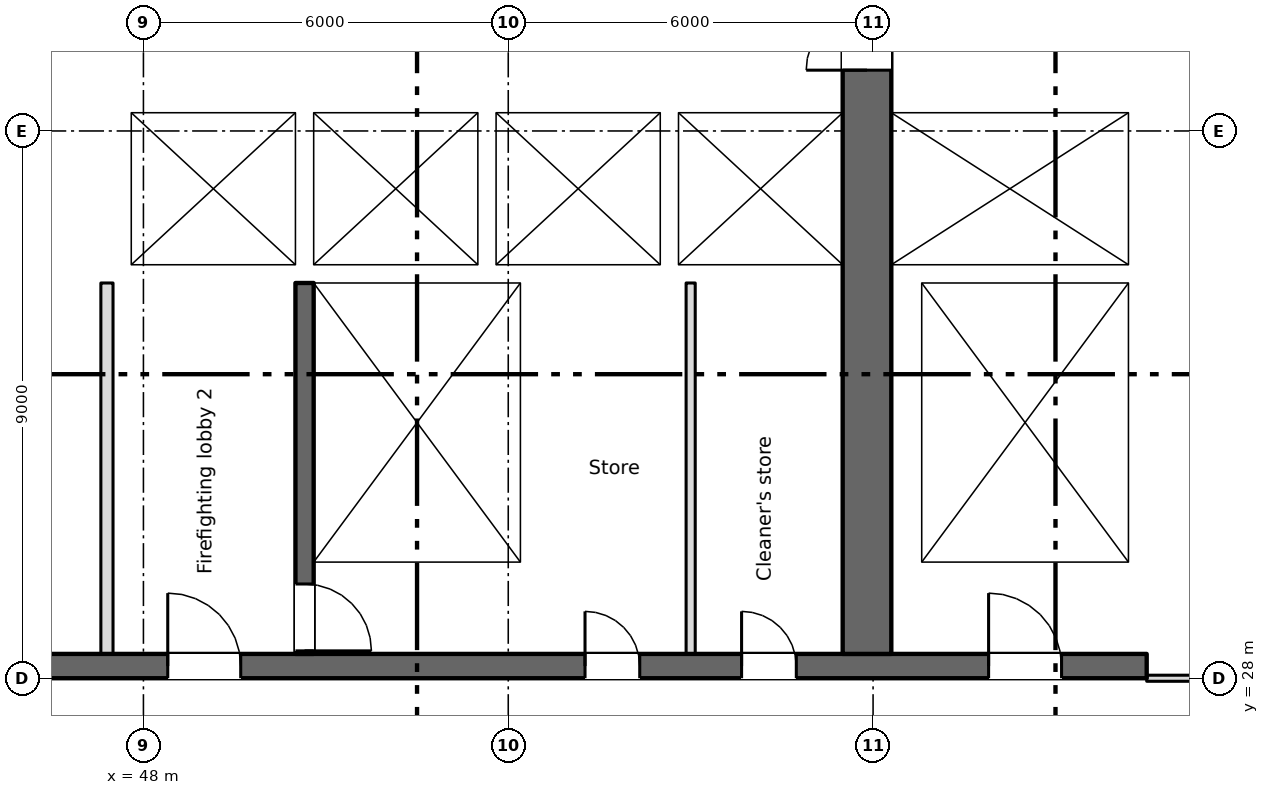
"""IFC4 building model, lengths in metres.
Left out: names, types, materials, properties, quantities, classifications, styles, units other than length and angle.
Written with IfcOpenShell. Run it as: python <this file> out.ifc"""

import sys

from ifc_helpers import new_model, si_unit, direction, frame, frame_2d, origin, place, context, subcontext, project, spatial, rectangle, extrude, element, fill, save


model = new_model("IFC4")
c1 = context("Model", 3, precision=1e-05, world=origin(), true_north=direction((0.0, 1.0)))
c2 = subcontext(c1, "Body", "Model", "MODEL_VIEW")
j1 = project(units=[si_unit("LENGTHUNIT", "METRE"), si_unit("PLANEANGLEUNIT", "RADIAN")], contexts=[c1])
p1 = place(None, origin())
s1 = spatial("IfcSite", under=j1, at=p1, CompositionType="ELEMENT")
p2 = place(p1, origin())
s2 = spatial("IfcBuilding", under=s1, at=p2, CompositionType="ELEMENT")
p3 = place(p2, frame((0.0, 0.0, 106.25)))
s3 = spatial("IfcBuildingStorey", under=s2, at=p3, CompositionType="ELEMENT", Elevation=106.25)
p4 = place(p3, frame((6.7, 28.2, 0.0), z_axis=(0.0, 0.0, 1.0), x_axis=(1.0, 0.0, 0.0)))
e1 = element("IfcWall", 1, at=p4, inside=s3, PredefinedType="SHEAR", context=c2, shape_type="SweptSolid", body=[
    extrude(rectangle(XDim=57.8, YDim=0.4, at=frame_2d((28.9, 0.0))), origin(), (0.0, 0.0, 1.0), 3.35),
])
p5 = place(p4, frame((13.85, 0.0, 0.0)))
e2 = element("IfcOpeningElement", 2, at=p5, cuts=e1, PredefinedType="OPENING", context=c2, shape_type="SweptSolid", body=[
    extrude(rectangle(XDim=0.9, YDim=2.1, at=frame_2d((0.45, 1.05))), frame((0.0, 0.21, 0.0), z_axis=(0.0, -1.0, 0.0), x_axis=(1.0, 0.0, 0.0)), (0.0, 0.0, 1.0), 0.42),
])
p6 = place(p4, frame((48.562, 0.0, 0.0)))
e3 = element("IfcOpeningElement", 3, at=p6, cuts=e1, PredefinedType="OPENING", context=c2, shape_type="SweptSolid", body=[
    extrude(rectangle(XDim=0.9, YDim=2.1, at=frame_2d((0.45, 1.05))), frame((0.0, 0.21, 0.0), z_axis=(0.0, -1.0, 0.0), x_axis=(1.0, 0.0, 0.0)), (0.0, 0.0, 1.0), 0.42),
])
p7 = place(p4, frame((51.137, 0.0, 0.0)))
e4 = element("IfcOpeningElement", 4, at=p7, cuts=e1, PredefinedType="OPENING", context=c2, shape_type="SweptSolid", body=[
    extrude(rectangle(XDim=0.9, YDim=2.1, at=frame_2d((0.45, 1.05))), frame((0.0, 0.21, 0.0), z_axis=(0.0, -1.0, 0.0), x_axis=(1.0, 0.0, 0.0)), (0.0, 0.0, 1.0), 0.42),
])
p8 = place(p4, frame((1.35, 0.0, 0.0)))
e5 = element("IfcOpeningElement", 5, at=p8, cuts=e1, PredefinedType="OPENING", context=c2, shape_type="SweptSolid", body=[
    extrude(rectangle(XDim=0.9, YDim=2.1, at=frame_2d((0.45, 1.05))), frame((0.0, 0.21, 0.0), z_axis=(0.0, -1.0, 0.0), x_axis=(1.0, 0.0, 0.0)), (0.0, 0.0, 1.0), 0.42),
])
p9 = place(p4, frame((4.7, 0.0, 0.0)))
e6 = element("IfcOpeningElement", 6, at=p9, cuts=e1, PredefinedType="OPENING", context=c2, shape_type="SweptSolid", body=[
    extrude(rectangle(XDim=1.2, YDim=2.1, at=frame_2d((0.6, 1.05))), frame((0.0, 0.21, 0.0), z_axis=(0.0, -1.0, 0.0), x_axis=(1.0, 0.0, 0.0)), (0.0, 0.0, 1.0), 0.42),
])
p10 = place(p4, frame((31.7, 0.0, 0.0)))
e7 = element("IfcOpeningElement", 7, at=p10, cuts=e1, PredefinedType="OPENING", context=c2, shape_type="SweptSolid", body=[
    extrude(rectangle(XDim=1.2, YDim=2.1, at=frame_2d((0.6, 1.05))), frame((0.0, 0.21, 0.0), z_axis=(0.0, -1.0, 0.0), x_axis=(1.0, 0.0, 0.0)), (0.0, 0.0, 1.0), 0.42),
])
p11 = place(p4, frame((55.2, 0.0, 0.0)))
e8 = element("IfcOpeningElement", 8, at=p11, cuts=e1, PredefinedType="OPENING", context=c2, shape_type="SweptSolid", body=[
    extrude(rectangle(XDim=1.2, YDim=2.1, at=frame_2d((0.6, 1.05))), frame((0.0, 0.21, 0.0), z_axis=(0.0, -1.0, 0.0), x_axis=(1.0, 0.0, 0.0)), (0.0, 0.0, 1.0), 0.42),
])
p12 = place(p4, frame((21.7, 0.0, 0.0)))
e9 = element("IfcOpeningElement", 9, at=p12, cuts=e1, PredefinedType="OPENING", context=c2, shape_type="SweptSolid", body=[
    extrude(rectangle(XDim=1.2, YDim=2.1, at=frame_2d((0.6, 1.05))), frame((0.0, 0.21, 0.0), z_axis=(0.0, -1.0, 0.0), x_axis=(1.0, 0.0, 0.0)), (0.0, 0.0, 1.0), 0.42),
])
p13 = place(p4, frame((41.7, 0.0, 0.0)))
e10 = element("IfcOpeningElement", 10, at=p13, cuts=e1, PredefinedType="OPENING", context=c2, shape_type="SweptSolid", body=[
    extrude(rectangle(XDim=1.2, YDim=2.1, at=frame_2d((0.6, 1.05))), frame((0.0, 0.21, 0.0), z_axis=(0.0, -1.0, 0.0), x_axis=(1.0, 0.0, 0.0)), (0.0, 0.0, 1.0), 0.42),
])
p14 = place(p4, frame((24.85, 0.0, 0.0)))
e11 = element("IfcOpeningElement", 11, at=p14, cuts=e1, PredefinedType="OPENING", context=c2, shape_type="SweptSolid", body=[
    extrude(rectangle(XDim=2.4, YDim=2.1, at=frame_2d((1.2, 1.05))), frame((0.0, 0.21, 0.0), z_axis=(0.0, -1.0, 0.0), x_axis=(1.0, 0.0, 0.0)), (0.0, 0.0, 1.0), 0.42),
])
p15 = place(p4, frame((37.35, 0.0, 0.0)))
e12 = element("IfcOpeningElement", 12, at=p15, cuts=e1, PredefinedType="OPENING", context=c2, shape_type="SweptSolid", body=[
    extrude(rectangle(XDim=2.4, YDim=2.1, at=frame_2d((1.2, 1.05))), frame((0.0, 0.21, 0.0), z_axis=(0.0, -1.0, 0.0), x_axis=(1.0, 0.0, 0.0)), (0.0, 0.0, 1.0), 0.42),
])
p16 = place(p4, frame((7.95, 0.0, 0.0)))
e13 = element("IfcOpeningElement", 13, at=p16, cuts=e1, PredefinedType="OPENING", context=c2, shape_type="SweptSolid", body=[
    extrude(rectangle(XDim=2.4, YDim=2.1, at=frame_2d((1.2, 1.05))), frame((0.0, 0.21, 0.0), z_axis=(0.0, -1.0, 0.0), x_axis=(1.0, 0.0, 0.0)), (0.0, 0.0, 1.0), 0.42),
])
p17 = place(p4, frame((28.85, 0.0, 0.0)))
e14 = element("IfcOpeningElement", 14, at=p17, cuts=e1, PredefinedType="OPENING", context=c2, shape_type="SweptSolid", body=[
    extrude(rectangle(XDim=0.9, YDim=2.1, at=frame_2d((0.45, 1.05))), frame((0.0, 0.21, 0.0), z_axis=(0.0, -1.0, 0.0), x_axis=(1.0, 0.0, 0.0)), (0.0, 0.0, 1.0), 0.42),
])
p18 = place(p4, frame((34.85, 0.0, 0.0)))
e15 = element("IfcOpeningElement", 15, at=p18, cuts=e1, PredefinedType="OPENING", context=c2, shape_type="SweptSolid", body=[
    extrude(rectangle(XDim=0.9, YDim=2.1, at=frame_2d((0.45, 1.05))), frame((0.0, 0.21, 0.0), z_axis=(0.0, -1.0, 0.0), x_axis=(1.0, 0.0, 0.0)), (0.0, 0.0, 1.0), 0.42),
])
p19 = place(p3, frame((64.35, 34.8, 0.0), z_axis=(0.0, 0.0, 1.0), x_axis=(0.0, 1.0, 0.0)))
e16 = element("IfcWall", 16, at=p19, inside=s3, PredefinedType="SHEAR", context=c2, shape_type="SweptSolid", body=[
    extrude(rectangle(XDim=10.4, YDim=0.3, at=frame_2d((5.2, 0.0))), origin(), (0.0, 0.0, 1.0), 3.35),
])
p20 = place(p3, frame((59.9, 28.4, 0.0), z_axis=(0.0, 0.0, 1.0), x_axis=(0.0, 1.0, 0.0)))
e17 = element("IfcWall", 17, at=p20, inside=s3, PredefinedType="SHEAR", context=c2, shape_type="SweptSolid", body=[
    extrude(rectangle(XDim=16.8, YDim=0.8, at=frame_2d((8.4, 0.0))), origin(), (0.0, 0.0, 1.0), 3.35),
])
p21 = place(p20, frame((9.6, 0.0, 0.0)))
e18 = element("IfcOpeningElement", 18, at=p21, cuts=e17, PredefinedType="OPENING", context=c2, shape_type="SweptSolid", body=[
    extrude(rectangle(XDim=2.0, YDim=2.1, at=frame_2d((1.0, 1.05))), frame((0.0, 0.41, 0.0), z_axis=(0.0, -1.0, 0.0), x_axis=(1.0, 0.0, 0.0)), (0.0, 0.0, 1.0), 0.82),
])
p22 = place(p20, frame((15.35, 0.0, 0.0)))
e19 = element("IfcOpeningElement", 19, at=p22, cuts=e17, PredefinedType="OPENING", context=c2, shape_type="SweptSolid", body=[
    extrude(rectangle(XDim=1.2, YDim=2.1, at=frame_2d((0.6, 1.05))), frame((0.0, 0.41, 0.0), z_axis=(0.0, -1.0, 0.0), x_axis=(1.0, 0.0, 0.0)), (0.0, 0.0, 1.0), 0.82),
])
p23 = place(p3, frame((50.65, 34.5, 0.0), z_axis=(0.0, 0.0, 1.0), x_axis=(0.0, -1.0, 0.0)))
e20 = element("IfcWall", 20, at=p23, inside=s3, PredefinedType="SHEAR", context=c2, shape_type="SweptSolid", body=[
    extrude(rectangle(XDim=6.1, YDim=0.3, at=frame_2d((3.05, 0.0))), origin(), (0.0, 0.0, 1.0), 3.35),
])
p24 = place(p23, frame((4.95, 0.0, 0.0)))
e21 = element("IfcOpeningElement", 21, at=p24, cuts=e20, PredefinedType="OPENING", context=c2, shape_type="SweptSolid", body=[
    extrude(rectangle(XDim=1.1, YDim=2.1, at=frame_2d((0.55, 1.05))), frame((0.0, 0.16, 0.0), z_axis=(0.0, -1.0, 0.0), x_axis=(1.0, 0.0, 0.0)), (0.0, 0.0, 1.0), 0.32),
])
p25 = place(p3, frame((54.35, 28.4, 0.0), z_axis=(0.0, 0.0, 1.0), x_axis=(0.0, 1.0, 0.0)))
e22 = element("IfcWall", 22, at=p25, inside=s3, PredefinedType="SHEAR", context=c2, shape_type="SweptSolid", body=[
    extrude(rectangle(XDim=6.1, YDim=0.3, at=frame_2d((3.05, 0.0))), origin(), (0.0, 0.0, 1.0), 3.35),
])
p26 = place(p3, frame((60.55, 28.4, 0.0), z_axis=(0.0, 0.0, 1.0), x_axis=(0.0, 1.0, 0.0)))
e23 = element("IfcWall", 23, at=p26, inside=s3, PredefinedType="SHEAR", context=c2, shape_type="SweptSolid", body=[
    extrude(rectangle(XDim=6.1, YDim=0.5, at=frame_2d((3.05, 0.0))), origin(), (0.0, 0.0, 1.0), 3.35),
])
p27 = place(p3, frame((64.35, 28.4, 0.0), z_axis=(0.0, 0.0, 1.0), x_axis=(0.0, 1.0, 0.0)))
e24 = element("IfcWall", 24, at=p27, inside=s3, PredefinedType="SHEAR", context=c2, shape_type="SweptSolid", body=[
    extrude(rectangle(XDim=6.1, YDim=0.3, at=frame_2d((3.05, 0.0))), origin(), (0.0, 0.0, 1.0), 3.35),
])
p28 = place(p3, frame((47.3, 34.65, 0.0), z_axis=(0.0, 0.0, 1.0), x_axis=(1.0, 0.0, 0.0)))
e25 = element("IfcWall", 25, at=p28, inside=s3, PredefinedType="SHEAR", context=c2, shape_type="SweptSolid", body=[
    extrude(rectangle(XDim=12.2, YDim=0.3, at=frame_2d((6.1, 0.0))), origin(), (0.0, 0.0, 1.0), 3.35),
])
p29 = place(p28, frame((1.3, 0.0, 0.0)))
e26 = element("IfcOpeningElement", 26, at=p29, cuts=e25, PredefinedType="OPENING", context=c2, shape_type="SweptSolid", body=[
    extrude(rectangle(XDim=1.1, YDim=2.1, at=frame_2d((0.55, 1.05))), frame((0.0, 0.16, 0.0), z_axis=(0.0, -1.0, 0.0), x_axis=(1.0, 0.0, 0.0)), (0.0, 0.0, 1.0), 0.32),
])
p30 = place(p3, frame((60.3, 34.65, 0.0), z_axis=(0.0, 0.0, 1.0), x_axis=(1.0, 0.0, 0.0)))
e27 = element("IfcWall", 27, at=p30, inside=s3, PredefinedType="SHEAR", context=c2, shape_type="SweptSolid", body=[
    extrude(rectangle(XDim=4.2, YDim=0.3, at=frame_2d((2.1, 0.0))), origin(), (0.0, 0.0, 1.0), 3.35),
])
p31 = place(p3, frame((47.3, 37.45, 0.0), z_axis=(0.0, 0.0, 1.0), x_axis=(1.0, 0.0, 0.0)))
e28 = element("IfcWall", 28, at=p31, inside=s3, PredefinedType="SHEAR", context=c2, shape_type="SweptSolid", body=[
    extrude(rectangle(XDim=12.2, YDim=0.3, at=frame_2d((6.1, 0.0))), origin(), (0.0, 0.0, 1.0), 3.35),
])
p32 = place(p31, frame((4.3, 0.0, 0.0)))
e29 = element("IfcOpeningElement", 29, at=p32, cuts=e28, PredefinedType="OPENING", context=c2, shape_type="SweptSolid", body=[
    extrude(rectangle(XDim=1.1, YDim=2.1, at=frame_2d((0.55, 1.05))), frame((0.0, 0.16, 0.0), z_axis=(0.0, -1.0, 0.0), x_axis=(1.0, 0.0, 0.0)), (0.0, 0.0, 1.0), 0.32),
])
p33 = place(p31, frame((7.3, 0.0, 0.0)))
e30 = element("IfcOpeningElement", 30, at=p33, cuts=e28, PredefinedType="OPENING", context=c2, shape_type="SweptSolid", body=[
    extrude(rectangle(XDim=1.1, YDim=2.1, at=frame_2d((0.55, 1.05))), frame((0.0, 0.16, 0.0), z_axis=(0.0, -1.0, 0.0), x_axis=(1.0, 0.0, 0.0)), (0.0, 0.0, 1.0), 0.32),
])
p34 = place(p31, frame((10.3, 0.0, 0.0)))
e31 = element("IfcOpeningElement", 31, at=p34, cuts=e28, PredefinedType="OPENING", context=c2, shape_type="SweptSolid", body=[
    extrude(rectangle(XDim=1.1, YDim=2.1, at=frame_2d((0.55, 1.05))), frame((0.0, 0.16, 0.0), z_axis=(0.0, -1.0, 0.0), x_axis=(1.0, 0.0, 0.0)), (0.0, 0.0, 1.0), 0.32),
])
p35 = place(p3, frame((60.3, 37.45, 0.0), z_axis=(0.0, 0.0, 1.0), x_axis=(1.0, 0.0, 0.0)))
e32 = element("IfcWall", 32, at=p35, inside=s3, PredefinedType="SHEAR", context=c2, shape_type="SweptSolid", body=[
    extrude(rectangle(XDim=3.9, YDim=0.3, at=frame_2d((1.95, 0.0))), origin(), (0.0, 0.0, 1.0), 3.35),
])
p36 = place(p35, frame((1.4, 0.0, 0.0)))
e33 = element("IfcOpeningElement", 33, at=p36, cuts=e32, PredefinedType="OPENING", context=c2, shape_type="SweptSolid", body=[
    extrude(rectangle(XDim=1.1, YDim=2.1, at=frame_2d((0.55, 1.05))), frame((0.0, 0.16, 0.0), z_axis=(0.0, -1.0, 0.0), x_axis=(1.0, 0.0, 0.0)), (0.0, 0.0, 1.0), 0.32),
])
p37 = place(p3, frame((47.55, 34.8, 0.0), z_axis=(0.0, 0.0, 1.0), x_axis=(0.0, 1.0, 0.0)))
e34 = element("IfcWall", 34, at=p37, inside=s3, PredefinedType="SHEAR", context=c2, shape_type="SweptSolid", body=[
    extrude(rectangle(XDim=2.5, YDim=0.5, at=frame_2d((1.25, 0.0))), origin(), (0.0, 0.0, 1.0), 3.35),
])
for number, where, z_axis, x_axis in (
    (35, (50.65, 34.8, 0.0), (0.0, 0.0, 1.0), (0.0, 1.0, 0.0)),
    (36, (53.65, 34.8, 0.0), (0.0, 0.0, 1.0), (0.0, 1.0, 0.0)),
    (37, (56.65, 34.8, 0.0), (0.0, 0.0, 1.0), (0.0, 1.0, 0.0)),
):
    element("IfcWall", number, at=place(p3, frame(where, z_axis=z_axis, x_axis=x_axis)), inside=s3, PredefinedType="SHEAR", context=c2, shape_type="SweptSolid", body=[
        extrude(rectangle(XDim=2.5, YDim=0.3, at=frame_2d((1.25, 0.0))), origin(), (0.0, 0.0, 1.0), 3.35),
    ])
p38 = place(p3, frame((47.4, 28.4, 0.0), z_axis=(0.0, 0.0, 1.0), x_axis=(0.0, 1.0, 0.0)))
e38 = element("IfcWall", 38, at=p38, inside=s3, PredefinedType="PARTITIONING", context=c2, shape_type="SweptSolid", body=[
    extrude(rectangle(XDim=6.1, YDim=0.2, at=frame_2d((3.05, 0.0))), origin(), (0.0, 0.0, 1.0), 3.35),
])
p39 = place(p3, frame((57.0, 28.4, 0.0), z_axis=(0.0, 0.0, 1.0), x_axis=(0.0, 1.0, 0.0)))
e39 = element("IfcWall", 39, at=p39, inside=s3, PredefinedType="PARTITIONING", context=c2, shape_type="SweptSolid", body=[
    extrude(rectangle(XDim=6.1, YDim=0.15, at=frame_2d((3.05, 0.0))), origin(), (0.0, 0.0, 1.0), 3.35),
])
p40 = place(p3, frame((64.5, 28.0, 0.0), z_axis=(0.0, 0.0, 1.0), x_axis=(1.0, 0.0, 0.0)))
e40 = element("IfcWall", 40, at=p40, inside=s3, PredefinedType="PARTITIONING", context=c2, shape_type="SweptSolid", body=[
    extrude(rectangle(XDim=6.8, YDim=0.1, at=frame_2d((3.4, 0.0))), origin(), (0.0, 0.0, 1.0), 3.35),
])
p41 = place(p40, frame((2.5, 0.0, 0.0)))
e41 = element("IfcOpeningElement", 41, at=p41, cuts=e40, PredefinedType="OPENING", context=c2, shape_type="SweptSolid", body=[
    extrude(rectangle(XDim=1.8, YDim=2.1, at=frame_2d((0.9, 1.05))), frame((0.0, 0.06, 0.0), z_axis=(0.0, -1.0, 0.0), x_axis=(1.0, 0.0, 0.0)), (0.0, 0.0, 1.0), 0.12),
])
p42 = place(p6, origin())
e42 = element("IfcDoor", 42, at=p42, inside=s3, OperationType="SINGLE_SWING_LEFT", PredefinedType="DOOR", context=c2, shape_type="SweptSolid", body=[
    extrude(rectangle(XDim=0.9, YDim=2.1, at=frame_2d((0.45, 1.05))), frame((0.0, 0.025, 0.0), z_axis=(0.0, -1.0, 0.0), x_axis=(1.0, 0.0, 0.0)), (0.0, 0.0, 1.0), 0.05),
])
fill(e3, e42)
p43 = place(p7, origin())
e43 = element("IfcDoor", 43, at=p43, inside=s3, OperationType="SINGLE_SWING_LEFT", PredefinedType="DOOR", context=c2, shape_type="SweptSolid", body=[
    extrude(rectangle(XDim=0.9, YDim=2.1, at=frame_2d((0.45, 1.05))), frame((0.0, 0.025, 0.0), z_axis=(0.0, -1.0, 0.0), x_axis=(1.0, 0.0, 0.0)), (0.0, 0.0, 1.0), 0.05),
])
fill(e4, e43)
p44 = place(p32, origin())
e44 = element("IfcDoor", 44, at=p44, inside=s3, OperationType="SLIDING_TO_LEFT", PredefinedType="DOOR", context=c2, shape_type="SweptSolid", body=[
    extrude(rectangle(XDim=1.1, YDim=2.1, at=frame_2d((0.55, 1.05))), frame((0.0, 0.025, 0.0), z_axis=(0.0, -1.0, 0.0), x_axis=(1.0, 0.0, 0.0)), (0.0, 0.0, 1.0), 0.05),
])
fill(e29, e44)
p45 = place(p33, origin())
e45 = element("IfcDoor", 45, at=p45, inside=s3, OperationType="SLIDING_TO_LEFT", PredefinedType="DOOR", context=c2, shape_type="SweptSolid", body=[
    extrude(rectangle(XDim=1.1, YDim=2.1, at=frame_2d((0.55, 1.05))), frame((0.0, 0.025, 0.0), z_axis=(0.0, -1.0, 0.0), x_axis=(1.0, 0.0, 0.0)), (0.0, 0.0, 1.0), 0.05),
])
fill(e30, e45)
p46 = place(p34, origin())
e46 = element("IfcDoor", 46, at=p46, inside=s3, OperationType="SLIDING_TO_LEFT", PredefinedType="DOOR", context=c2, shape_type="SweptSolid", body=[
    extrude(rectangle(XDim=1.1, YDim=2.1, at=frame_2d((0.55, 1.05))), frame((0.0, 0.025, 0.0), z_axis=(0.0, -1.0, 0.0), x_axis=(1.0, 0.0, 0.0)), (0.0, 0.0, 1.0), 0.05),
])
fill(e31, e46)
p47 = place(p36, origin())
e47 = element("IfcDoor", 47, at=p47, inside=s3, OperationType="SLIDING_TO_LEFT", PredefinedType="DOOR", context=c2, shape_type="SweptSolid", body=[
    extrude(rectangle(XDim=1.1, YDim=2.1, at=frame_2d((0.55, 1.05))), frame((0.0, 0.025, 0.0), z_axis=(0.0, -1.0, 0.0), x_axis=(1.0, 0.0, 0.0)), (0.0, 0.0, 1.0), 0.05),
])
fill(e33, e47)
p48 = place(p29, origin())
e48 = element("IfcDoor", 48, at=p48, inside=s3, OperationType="SLIDING_TO_LEFT", PredefinedType="DOOR", context=c2, shape_type="SweptSolid", body=[
    extrude(rectangle(XDim=1.1, YDim=2.1, at=frame_2d((0.55, 1.05))), frame((0.0, 0.025, 0.0), z_axis=(0.0, -1.0, 0.0), x_axis=(1.0, 0.0, 0.0)), (0.0, 0.0, 1.0), 0.05),
])
fill(e26, e48)
p49 = place(p24, origin())
e49 = element("IfcDoor", 49, at=p49, inside=s3, OperationType="SINGLE_SWING_RIGHT", PredefinedType="DOOR", context=c2, shape_type="SweptSolid", body=[
    extrude(rectangle(XDim=1.1, YDim=2.1, at=frame_2d((0.55, 1.05))), frame((0.0, 0.025, 0.0), z_axis=(0.0, -1.0, 0.0), x_axis=(1.0, 0.0, 0.0)), (0.0, 0.0, 1.0), 0.05),
])
fill(e21, e49)
p50 = place(p11, origin())
e50 = element("IfcDoor", 50, at=p50, inside=s3, OperationType="SINGLE_SWING_LEFT", PredefinedType="DOOR", context=c2, shape_type="SweptSolid", body=[
    extrude(rectangle(XDim=1.2, YDim=2.1, at=frame_2d((0.6, 1.05))), frame((0.0, 0.025, 0.0), z_axis=(0.0, -1.0, 0.0), x_axis=(1.0, 0.0, 0.0)), (0.0, 0.0, 1.0), 0.05),
])
fill(e8, e50)
p51 = place(p13, origin())
e51 = element("IfcDoor", 51, at=p51, inside=s3, OperationType="SINGLE_SWING_LEFT", PredefinedType="DOOR", context=c2, shape_type="SweptSolid", body=[
    extrude(rectangle(XDim=1.2, YDim=2.1, at=frame_2d((0.6, 1.05))), frame((0.0, 0.025, 0.0), z_axis=(0.0, -1.0, 0.0), x_axis=(1.0, 0.0, 0.0)), (0.0, 0.0, 1.0), 0.05),
])
fill(e10, e51)
p52 = place(p21, origin())
e52 = element("IfcDoor", 52, at=p52, inside=s3, OperationType="DOUBLE_DOOR_SINGLE_SWING", PredefinedType="DOOR", context=c2, shape_type="SweptSolid", body=[
    extrude(rectangle(XDim=2.0, YDim=2.1, at=frame_2d((1.0, 1.05))), frame((0.0, 0.025, 0.0), z_axis=(0.0, -1.0, 0.0), x_axis=(1.0, 0.0, 0.0)), (0.0, 0.0, 1.0), 0.05),
])
fill(e18, e52)
save(model, sys.argv[1])
